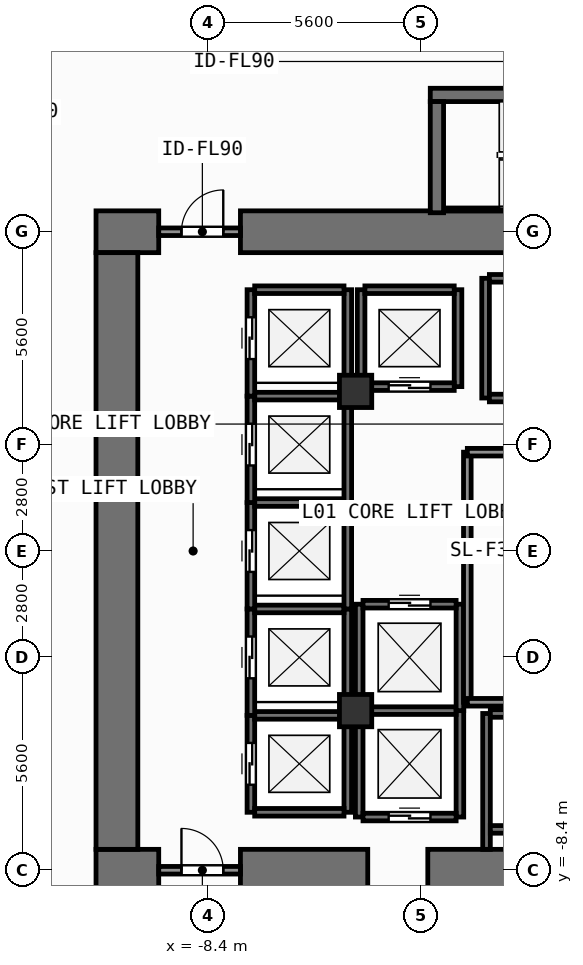
"""IFC4 building model, lengths in metres.
Left out: names, types, materials, properties, quantities, classifications, styles, units other than length and angle.
Written with IfcOpenShell. Run it as: python <this file> out.ifc"""

import sys

from ifc_helpers import new_model, si_unit, direction, frame, frame_2d, origin, origin_2d, place, context, subcontext, project, spatial, rectangle, extrude, element, fill, save


model = new_model("IFC4")
c1 = context("Model", 3, precision=1e-05, world=origin(), true_north=direction((0.0, 1.0)))
c2 = subcontext(c1, "Body", "Model", "MODEL_VIEW")
j1 = project(units=[si_unit("LENGTHUNIT", "METRE"), si_unit("PLANEANGLEUNIT", "RADIAN")], contexts=[c1])
p1 = place(None, origin())
s1 = spatial("IfcSite", under=j1, at=p1, CompositionType="ELEMENT")
p2 = place(p1, origin())
s2 = spatial("IfcBuilding", under=s1, at=p2, CompositionType="ELEMENT")
p3 = place(p2, origin())
s3 = spatial("IfcBuildingStorey", under=s2, at=p3, CompositionType="ELEMENT", Elevation=0.0)
p4 = place(p3, frame((-11.35, -8.4, 0.0), z_axis=(0.0, 0.0, 1.0), x_axis=(1.0, 0.0, 0.0)))
e1 = element("IfcWall", 1, at=p4, inside=s3, PredefinedType="SHEAR", context=c2, shape_type="SweptSolid", body=[
    extrude(rectangle(XDim=1.65, YDim=1.1, at=frame_2d((0.825, 0.0))), origin(), (0.0, 0.0, 1.0), 4.8),
])
p5 = place(p3, frame((-7.55, -8.4, 0.0), z_axis=(0.0, 0.0, 1.0), x_axis=(1.0, 0.0, 0.0)))
e2 = element("IfcWall", 2, at=p5, inside=s3, PredefinedType="SHEAR", context=c2, shape_type="SweptSolid", body=[
    extrude(rectangle(XDim=3.35, YDim=1.1, at=frame_2d((1.675, 0.0))), origin(), (0.0, 0.0, 1.0), 4.8),
])
p6 = place(p3, frame((-2.62, -8.4, 0.0), z_axis=(0.0, 0.0, 1.0), x_axis=(1.0, 0.0, 0.0)))
e3 = element("IfcWall", 3, at=p6, inside=s3, PredefinedType="SHEAR", context=c2, shape_type="SweptSolid", body=[
    extrude(rectangle(XDim=7.27, YDim=1.1, at=frame_2d((3.635, 0.0))), origin(), (0.0, 0.0, 1.0), 4.8),
])
p7 = place(p3, frame((-11.35, 8.4, 0.0), z_axis=(0.0, 0.0, 1.0), x_axis=(1.0, 0.0, 0.0)))
e4 = element("IfcWall", 4, at=p7, inside=s3, PredefinedType="SHEAR", context=c2, shape_type="SweptSolid", body=[
    extrude(rectangle(XDim=1.65, YDim=1.1, at=frame_2d((0.825, 0.0))), origin(), (0.0, 0.0, 1.0), 4.8),
])
p8 = place(p3, frame((-7.55, 8.4, 0.0), z_axis=(0.0, 0.0, 1.0), x_axis=(1.0, 0.0, 0.0)))
e5 = element("IfcWall", 5, at=p8, inside=s3, PredefinedType="SHEAR", context=c2, shape_type="SweptSolid", body=[
    extrude(rectangle(XDim=16.5, YDim=1.1, at=frame_2d((8.25, 0.0))), origin(), (0.0, 0.0, 1.0), 4.8),
])
p9 = place(p3, frame((-10.8, -7.85, 0.0), z_axis=(0.0, 0.0, 1.0), x_axis=(0.0, 1.0, 0.0)))
e6 = element("IfcWall", 6, at=p9, inside=s3, PredefinedType="SHEAR", context=c2, shape_type="SweptSolid", body=[
    extrude(rectangle(XDim=15.7, YDim=1.1, at=frame_2d((7.85, 0.0))), origin(), (0.0, 0.0, 1.0), 4.8),
])
p10 = place(p3, frame((-2.555, 12.0, 0.0), z_axis=(0.0, 0.0, 1.0), x_axis=(1.0, 0.0, 0.0)))
e7 = element("IfcWall", 7, at=p10, inside=s3, PredefinedType="SHEAR", context=c2, shape_type="SweptSolid", body=[
    extrude(rectangle(XDim=7.31, YDim=0.35, at=frame_2d((3.655, 0.0))), origin(), (0.0, 0.0, 1.0), 4.8),
])
p11 = place(p3, frame((-2.2, 8.988, 0.0), z_axis=(0.0, 0.0, 1.0), x_axis=(1.0, 0.0, 0.0)))
e8 = element("IfcWall", 8, at=p11, inside=s3, PredefinedType="SHEAR", context=c2, shape_type="SweptSolid", body=[
    extrude(rectangle(XDim=6.6, YDim=0.075, at=frame_2d((3.3, 0.0))), origin(), (0.0, 0.0, 1.0), 4.8),
])
p12 = place(p3, frame((-2.38, 8.9, 0.0), z_axis=(0.0, 0.0, 1.0), x_axis=(0.0, 1.0, 0.0)))
e9 = element("IfcWall", 9, at=p12, inside=s3, PredefinedType="SHEAR", context=c2, shape_type="SweptSolid", body=[
    extrude(rectangle(XDim=2.925, YDim=0.35, at=frame_2d((1.462, 0.0))), origin(), (0.0, 0.0, 1.0), 4.8),
])
for number, where, z_axis, x_axis in (
    (10, (-4.52, -4.2, 0.0), (0.0, 0.0, 1.0), (1.0, 0.0, 0.0)),
    (11, (-4.52, 4.2, 0.0), (0.0, 0.0, 1.0), (1.0, 0.0, 0.0)),
):
    element("IfcColumn", number, at=place(p3, frame(where, z_axis=z_axis, x_axis=x_axis)), inside=s3, PredefinedType="COLUMN", context=c2, shape_type="SweptSolid", body=[
        extrude(rectangle(XDim=0.85, YDim=0.85, at=origin_2d()), origin(), (0.0, 0.0, 1.0), 4.8),
    ])
p13 = place(p3, frame((-7.275, -6.875, 0.0), z_axis=(0.0, 0.0, 1.0), x_axis=(0.0, 1.0, 0.0)))
e12 = element("IfcWall", 12, at=p13, inside=s3, PredefinedType="SHEAR", context=c2, shape_type="SweptSolid", body=[
    extrude(rectangle(XDim=2.55, YDim=0.2, at=frame_2d((1.275, 0.0))), origin(), (0.0, 0.0, 1.0), 4.56),
])
p14 = place(p13, frame((0.725, 0.0, 0.0)))
e13 = element("IfcOpeningElement", 13, at=p14, cuts=e12, PredefinedType="OPENING", context=c2, shape_type="SweptSolid", body=[
    extrude(rectangle(XDim=1.1, YDim=2.2, at=frame_2d((0.55, 1.1))), frame((0.0, 0.11, 0.0), z_axis=(0.0, -1.0, 0.0), x_axis=(1.0, 0.0, 0.0)), (0.0, 0.0, 1.0), 0.22),
])
p15 = place(p3, frame((-4.725, -6.875, 0.0), z_axis=(0.0, 0.0, 1.0), x_axis=(0.0, 1.0, 0.0)))
e14 = element("IfcWall", 14, at=p15, inside=s3, PredefinedType="SHEAR", context=c2, shape_type="SweptSolid", body=[
    extrude(rectangle(XDim=2.55, YDim=0.2, at=frame_2d((1.275, 0.0))), origin(), (0.0, 0.0, 1.0), 4.56),
])
for number, where, z_axis, x_axis in (
    (15, (-7.175, -6.875, 0.0), (0.0, 0.0, 1.0), (1.0, 0.0, 0.0)),
    (16, (-7.175, -4.325, 0.0), (0.0, 0.0, 1.0), (1.0, 0.0, 0.0)),
):
    element("IfcWall", number, at=place(p3, frame(where, z_axis=z_axis, x_axis=x_axis)), inside=s3, PredefinedType="SHEAR", context=c2, shape_type="SweptSolid", body=[
        extrude(rectangle(XDim=2.35, YDim=0.2, at=frame_2d((1.175, 0.0))), origin(), (0.0, 0.0, 1.0), 4.56),
    ])
p16 = place(p3, frame((-7.275, -4.325, 0.0), z_axis=(0.0, 0.0, 1.0), x_axis=(0.0, 1.0, 0.0)))
e17 = element("IfcWall", 17, at=p16, inside=s3, PredefinedType="SHEAR", context=c2, shape_type="SweptSolid", body=[
    extrude(rectangle(XDim=2.8, YDim=0.2, at=frame_2d((1.4, 0.0))), origin(), (0.0, 0.0, 1.0), 4.56),
])
p17 = place(p16, frame((0.975, 0.0, 0.0)))
e18 = element("IfcOpeningElement", 18, at=p17, cuts=e17, PredefinedType="OPENING", context=c2, shape_type="SweptSolid", body=[
    extrude(rectangle(XDim=1.1, YDim=2.2, at=frame_2d((0.55, 1.1))), frame((0.0, 0.11, 0.0), z_axis=(0.0, -1.0, 0.0), x_axis=(1.0, 0.0, 0.0)), (0.0, 0.0, 1.0), 0.22),
])
p18 = place(p3, frame((-4.725, -4.325, 0.0), z_axis=(0.0, 0.0, 1.0), x_axis=(0.0, 1.0, 0.0)))
e19 = element("IfcWall", 19, at=p18, inside=s3, PredefinedType="SHEAR", context=c2, shape_type="SweptSolid", body=[
    extrude(rectangle(XDim=2.8, YDim=0.2, at=frame_2d((1.4, 0.0))), origin(), (0.0, 0.0, 1.0), 4.56),
])
p19 = place(p3, frame((-7.175, -1.525, 0.0), z_axis=(0.0, 0.0, 1.0), x_axis=(1.0, 0.0, 0.0)))
e20 = element("IfcWall", 20, at=p19, inside=s3, PredefinedType="SHEAR", context=c2, shape_type="SweptSolid", body=[
    extrude(rectangle(XDim=2.35, YDim=0.2, at=frame_2d((1.175, 0.0))), origin(), (0.0, 0.0, 1.0), 4.56),
])
p20 = place(p3, frame((-7.275, -1.525, 0.0), z_axis=(0.0, 0.0, 1.0), x_axis=(0.0, 1.0, 0.0)))
e21 = element("IfcWall", 21, at=p20, inside=s3, PredefinedType="SHEAR", context=c2, shape_type="SweptSolid", body=[
    extrude(rectangle(XDim=2.8, YDim=0.2, at=frame_2d((1.4, 0.0))), origin(), (0.0, 0.0, 1.0), 4.56),
])
p21 = place(p20, frame((0.975, 0.0, 0.0)))
e22 = element("IfcOpeningElement", 22, at=p21, cuts=e21, PredefinedType="OPENING", context=c2, shape_type="SweptSolid", body=[
    extrude(rectangle(XDim=1.1, YDim=2.2, at=frame_2d((0.55, 1.1))), frame((0.0, 0.11, 0.0), z_axis=(0.0, -1.0, 0.0), x_axis=(1.0, 0.0, 0.0)), (0.0, 0.0, 1.0), 0.22),
])
p22 = place(p3, frame((-4.725, -1.525, 0.0), z_axis=(0.0, 0.0, 1.0), x_axis=(0.0, 1.0, 0.0)))
e23 = element("IfcWall", 23, at=p22, inside=s3, PredefinedType="SHEAR", context=c2, shape_type="SweptSolid", body=[
    extrude(rectangle(XDim=2.8, YDim=0.2, at=frame_2d((1.4, 0.0))), origin(), (0.0, 0.0, 1.0), 4.56),
])
p23 = place(p3, frame((-7.175, 1.275, 0.0), z_axis=(0.0, 0.0, 1.0), x_axis=(1.0, 0.0, 0.0)))
e24 = element("IfcWall", 24, at=p23, inside=s3, PredefinedType="SHEAR", context=c2, shape_type="SweptSolid", body=[
    extrude(rectangle(XDim=2.35, YDim=0.2, at=frame_2d((1.175, 0.0))), origin(), (0.0, 0.0, 1.0), 4.56),
])
p24 = place(p3, frame((-7.275, 1.275, 0.0), z_axis=(0.0, 0.0, 1.0), x_axis=(0.0, 1.0, 0.0)))
e25 = element("IfcWall", 25, at=p24, inside=s3, PredefinedType="SHEAR", context=c2, shape_type="SweptSolid", body=[
    extrude(rectangle(XDim=2.8, YDim=0.2, at=frame_2d((1.4, 0.0))), origin(), (0.0, 0.0, 1.0), 4.56),
])
p25 = place(p24, frame((0.975, 0.0, 0.0)))
e26 = element("IfcOpeningElement", 26, at=p25, cuts=e25, PredefinedType="OPENING", context=c2, shape_type="SweptSolid", body=[
    extrude(rectangle(XDim=1.1, YDim=2.2, at=frame_2d((0.55, 1.1))), frame((0.0, 0.11, 0.0), z_axis=(0.0, -1.0, 0.0), x_axis=(1.0, 0.0, 0.0)), (0.0, 0.0, 1.0), 0.22),
])
p26 = place(p3, frame((-4.725, 1.275, 0.0), z_axis=(0.0, 0.0, 1.0), x_axis=(0.0, 1.0, 0.0)))
e27 = element("IfcWall", 27, at=p26, inside=s3, PredefinedType="SHEAR", context=c2, shape_type="SweptSolid", body=[
    extrude(rectangle(XDim=2.8, YDim=0.2, at=frame_2d((1.4, 0.0))), origin(), (0.0, 0.0, 1.0), 4.56),
])
p27 = place(p3, frame((-7.175, 4.075, 0.0), z_axis=(0.0, 0.0, 1.0), x_axis=(1.0, 0.0, 0.0)))
e28 = element("IfcWall", 28, at=p27, inside=s3, PredefinedType="SHEAR", context=c2, shape_type="SweptSolid", body=[
    extrude(rectangle(XDim=2.35, YDim=0.2, at=frame_2d((1.175, 0.0))), origin(), (0.0, 0.0, 1.0), 4.56),
])
p28 = place(p3, frame((-7.275, 4.075, 0.0), z_axis=(0.0, 0.0, 1.0), x_axis=(0.0, 1.0, 0.0)))
e29 = element("IfcWall", 29, at=p28, inside=s3, PredefinedType="SHEAR", context=c2, shape_type="SweptSolid", body=[
    extrude(rectangle(XDim=2.8, YDim=0.2, at=frame_2d((1.4, 0.0))), origin(), (0.0, 0.0, 1.0), 4.56),
])
p29 = place(p28, frame((0.975, 0.0, 0.0)))
e30 = element("IfcOpeningElement", 30, at=p29, cuts=e29, PredefinedType="OPENING", context=c2, shape_type="SweptSolid", body=[
    extrude(rectangle(XDim=1.1, YDim=2.2, at=frame_2d((0.55, 1.1))), frame((0.0, 0.11, 0.0), z_axis=(0.0, -1.0, 0.0), x_axis=(1.0, 0.0, 0.0)), (0.0, 0.0, 1.0), 0.22),
])
p30 = place(p3, frame((-4.725, 4.075, 0.0), z_axis=(0.0, 0.0, 1.0), x_axis=(0.0, 1.0, 0.0)))
e31 = element("IfcWall", 31, at=p30, inside=s3, PredefinedType="SHEAR", context=c2, shape_type="SweptSolid", body=[
    extrude(rectangle(XDim=2.8, YDim=0.2, at=frame_2d((1.4, 0.0))), origin(), (0.0, 0.0, 1.0), 4.56),
])
p31 = place(p3, frame((-7.175, 6.875, 0.0), z_axis=(0.0, 0.0, 1.0), x_axis=(1.0, 0.0, 0.0)))
e32 = element("IfcWall", 32, at=p31, inside=s3, PredefinedType="SHEAR", context=c2, shape_type="SweptSolid", body=[
    extrude(rectangle(XDim=2.35, YDim=0.2, at=frame_2d((1.175, 0.0))), origin(), (0.0, 0.0, 1.0), 4.56),
])
for number, where, z_axis, x_axis in (
    (33, (-4.375, 4.325, 0.0), (0.0, 0.0, 1.0), (0.0, 1.0, 0.0)),
    (34, (-1.825, 4.325, 0.0), (0.0, 0.0, 1.0), (0.0, 1.0, 0.0)),
):
    element("IfcWall", number, at=place(p3, frame(where, z_axis=z_axis, x_axis=x_axis)), inside=s3, PredefinedType="SHEAR", context=c2, shape_type="SweptSolid", body=[
        extrude(rectangle(XDim=2.55, YDim=0.2, at=frame_2d((1.275, 0.0))), origin(), (0.0, 0.0, 1.0), 4.56),
    ])
p32 = place(p3, frame((-4.275, 4.325, 0.0), z_axis=(0.0, 0.0, 1.0), x_axis=(1.0, 0.0, 0.0)))
e35 = element("IfcWall", 35, at=p32, inside=s3, PredefinedType="SHEAR", context=c2, shape_type="SweptSolid", body=[
    extrude(rectangle(XDim=2.35, YDim=0.2, at=frame_2d((1.175, 0.0))), origin(), (0.0, 0.0, 1.0), 4.56),
])
p33 = place(p32, frame((0.625, 0.0, 0.0)))
e36 = element("IfcOpeningElement", 36, at=p33, cuts=e35, PredefinedType="OPENING", context=c2, shape_type="SweptSolid", body=[
    extrude(rectangle(XDim=1.1, YDim=2.2, at=frame_2d((0.55, 1.1))), frame((0.0, 0.11, 0.0), z_axis=(0.0, -1.0, 0.0), x_axis=(1.0, 0.0, 0.0)), (0.0, 0.0, 1.0), 0.22),
])
p34 = place(p3, frame((-4.275, 6.875, 0.0), z_axis=(0.0, 0.0, 1.0), x_axis=(1.0, 0.0, 0.0)))
e37 = element("IfcWall", 37, at=p34, inside=s3, PredefinedType="SHEAR", context=c2, shape_type="SweptSolid", body=[
    extrude(rectangle(XDim=2.35, YDim=0.2, at=frame_2d((1.175, 0.0))), origin(), (0.0, 0.0, 1.0), 4.56),
])
for number, where, z_axis, x_axis in (
    (38, (-4.425, -7.0, 0.0), (0.0, 0.0, 1.0), (0.0, 1.0, 0.0)),
    (39, (-1.775, -7.0, 0.0), (0.0, 0.0, 1.0), (0.0, 1.0, 0.0)),
):
    element("IfcWall", number, at=place(p3, frame(where, z_axis=z_axis, x_axis=x_axis)), inside=s3, PredefinedType="SHEAR", context=c2, shape_type="SweptSolid", body=[
        extrude(rectangle(XDim=2.8, YDim=0.2, at=frame_2d((1.4, 0.0))), origin(), (0.0, 0.0, 1.0), 4.56),
    ])
p35 = place(p3, frame((-4.325, -7.0, 0.0), z_axis=(0.0, 0.0, 1.0), x_axis=(1.0, 0.0, 0.0)))
e40 = element("IfcWall", 40, at=p35, inside=s3, PredefinedType="SHEAR", context=c2, shape_type="SweptSolid", body=[
    extrude(rectangle(XDim=2.45, YDim=0.2, at=frame_2d((1.225, 0.0))), origin(), (0.0, 0.0, 1.0), 4.56),
])
p36 = place(p35, frame((0.675, 0.0, 0.0)))
e41 = element("IfcOpeningElement", 41, at=p36, cuts=e40, PredefinedType="OPENING", context=c2, shape_type="SweptSolid", body=[
    extrude(rectangle(XDim=1.1, YDim=2.2, at=frame_2d((0.55, 1.1))), frame((0.0, 0.11, 0.0), z_axis=(0.0, -1.0, 0.0), x_axis=(1.0, 0.0, 0.0)), (0.0, 0.0, 1.0), 0.22),
])
p37 = place(p3, frame((-4.325, -4.2, 0.0), z_axis=(0.0, 0.0, 1.0), x_axis=(1.0, 0.0, 0.0)))
e42 = element("IfcWall", 42, at=p37, inside=s3, PredefinedType="SHEAR", context=c2, shape_type="SweptSolid", body=[
    extrude(rectangle(XDim=2.45, YDim=0.2, at=frame_2d((1.225, 0.0))), origin(), (0.0, 0.0, 1.0), 4.56),
])
for number, where, z_axis, x_axis in (
    (43, (-4.425, -4.2, 0.0), (0.0, 0.0, 1.0), (0.0, 1.0, 0.0)),
    (44, (-1.775, -4.2, 0.0), (0.0, 0.0, 1.0), (0.0, 1.0, 0.0)),
):
    element("IfcWall", number, at=place(p3, frame(where, z_axis=z_axis, x_axis=x_axis)), inside=s3, PredefinedType="SHEAR", context=c2, shape_type="SweptSolid", body=[
        extrude(rectangle(XDim=2.8, YDim=0.2, at=frame_2d((1.4, 0.0))), origin(), (0.0, 0.0, 1.0), 4.56),
    ])
p38 = place(p3, frame((-4.325, -1.4, 0.0), z_axis=(0.0, 0.0, 1.0), x_axis=(1.0, 0.0, 0.0)))
e45 = element("IfcWall", 45, at=p38, inside=s3, PredefinedType="SHEAR", context=c2, shape_type="SweptSolid", body=[
    extrude(rectangle(XDim=2.45, YDim=0.2, at=frame_2d((1.225, 0.0))), origin(), (0.0, 0.0, 1.0), 4.56),
])
p39 = place(p38, frame((0.675, 0.0, 0.0)))
e46 = element("IfcOpeningElement", 46, at=p39, cuts=e45, PredefinedType="OPENING", context=c2, shape_type="SweptSolid", body=[
    extrude(rectangle(XDim=1.1, YDim=2.2, at=frame_2d((0.55, 1.1))), frame((0.0, 0.11, 0.0), z_axis=(0.0, -1.0, 0.0), x_axis=(1.0, 0.0, 0.0)), (0.0, 0.0, 1.0), 0.22),
])
p40 = place(p3, frame((-1.1, 4.025, 0.0), z_axis=(0.0, 0.0, 1.0), x_axis=(0.0, 1.0, 0.0)))
e47 = element("IfcWall", 47, at=p40, inside=s3, PredefinedType="SHEAR", context=c2, shape_type="SweptSolid", body=[
    extrude(rectangle(XDim=3.15, YDim=0.2, at=frame_2d((1.575, 0.0))), origin(), (0.0, 0.0, 1.0), 4.56),
])
for number, where, z_axis, x_axis in (
    (48, (-1.0, 4.025, 0.0), (0.0, 0.0, 1.0), (1.0, 0.0, 0.0)),
    (49, (-1.0, 7.175, 0.0), (0.0, 0.0, 1.0), (1.0, 0.0, 0.0)),
):
    element("IfcWall", number, at=place(p3, frame(where, z_axis=z_axis, x_axis=x_axis)), inside=s3, PredefinedType="SHEAR", context=c2, shape_type="SweptSolid", body=[
        extrude(rectangle(XDim=2.4, YDim=0.2, at=frame_2d((1.2, 0.0))), origin(), (0.0, 0.0, 1.0), 4.56),
    ])
p41 = place(p3, frame((-1.075, -7.85, 0.0), z_axis=(0.0, 0.0, 1.0), x_axis=(0.0, 1.0, 0.0)))
e50 = element("IfcWall", 50, at=p41, inside=s3, PredefinedType="SHEAR", context=c2, shape_type="SweptSolid", body=[
    extrude(rectangle(XDim=3.575, YDim=0.2, at=frame_2d((1.788, 0.0))), origin(), (0.0, 0.0, 1.0), 4.56),
])
for number, where, z_axis, x_axis in (
    (51, (-0.975, -7.325, 0.0), (0.0, 0.0, 1.0), (1.0, 0.0, 0.0)),
    (52, (-0.975, -4.275, 0.0), (0.0, 0.0, 1.0), (1.0, 0.0, 0.0)),
):
    element("IfcWall", number, at=place(p3, frame(where, z_axis=z_axis, x_axis=x_axis)), inside=s3, PredefinedType="SHEAR", context=c2, shape_type="SweptSolid", body=[
        extrude(rectangle(XDim=2.35, YDim=0.2, at=frame_2d((1.175, 0.0))), origin(), (0.0, 0.0, 1.0), 4.56),
    ])
p42 = place(p3, frame((-9.7, -8.4, 0.0), z_axis=(0.0, 0.0, 1.0), x_axis=(1.0, 0.0, 0.0)))
e53 = element("IfcWall", 53, at=p42, inside=s3, PredefinedType="SOLIDWALL", context=c2, shape_type="SweptSolid", body=[
    extrude(rectangle(XDim=2.15, YDim=0.2, at=frame_2d((1.075, 0.0))), origin(), (0.0, 0.0, 1.0), 3.6),
])
p43 = place(p42, frame((0.598, 0.0, 0.0)))
e54 = element("IfcOpeningElement", 54, at=p43, cuts=e53, PredefinedType="OPENING", context=c2, shape_type="SweptSolid", body=[
    extrude(rectangle(XDim=1.1, YDim=2.15, at=frame_2d((0.55, 1.075))), frame((0.0, 0.11, 0.0), z_axis=(0.0, -1.0, 0.0), x_axis=(1.0, 0.0, 0.0)), (0.0, 0.0, 1.0), 0.22),
])
p44 = place(p3, frame((-9.7, 8.4, 0.0), z_axis=(0.0, 0.0, 1.0), x_axis=(1.0, 0.0, 0.0)))
e55 = element("IfcWall", 55, at=p44, inside=s3, PredefinedType="SOLIDWALL", context=c2, shape_type="SweptSolid", body=[
    extrude(rectangle(XDim=2.15, YDim=0.2, at=frame_2d((1.075, 0.0))), origin(), (0.0, 0.0, 1.0), 3.6),
])
p45 = place(p44, frame((0.598, 0.0, 0.0)))
e56 = element("IfcOpeningElement", 56, at=p45, cuts=e55, PredefinedType="OPENING", context=c2, shape_type="SweptSolid", body=[
    extrude(rectangle(XDim=1.1, YDim=2.15, at=frame_2d((0.55, 1.075))), frame((0.0, 0.11, 0.0), z_axis=(0.0, -1.0, 0.0), x_axis=(1.0, 0.0, 0.0)), (0.0, 0.0, 1.0), 0.22),
])
p46 = place(p3, frame((-1.58, -3.98, 0.0), z_axis=(0.0, 0.0, 1.0), x_axis=(0.0, 1.0, 0.0)))
e57 = element("IfcWall", 57, at=p46, inside=s3, PredefinedType="SOLIDWALL", context=c2, shape_type="SweptSolid", body=[
    extrude(rectangle(XDim=6.58, YDim=0.2, at=frame_2d((3.29, 0.0))), origin(), (0.0, 0.0, 1.0), 4.56),
])
for number, where, z_axis, x_axis in (
    (58, (-1.58, -3.98, 0.0), (0.0, 0.0, 1.0), (1.0, 0.0, 0.0)),
    (59, (-1.58, 2.6, 0.0), (0.0, 0.0, 1.0), (1.0, 0.0, 0.0)),
):
    element("IfcWall", number, at=place(p3, frame(where, z_axis=z_axis, x_axis=x_axis)), inside=s3, PredefinedType="SOLIDWALL", context=c2, shape_type="SweptSolid", body=[
        extrude(rectangle(XDim=3.19, YDim=0.2, at=frame_2d((1.595, 0.0))), origin(), (0.0, 0.0, 1.0), 4.56),
    ])
p47 = place(p14, origin())
e60 = element("IfcDoor", 60, at=p47, inside=s3, OperationType="SLIDING_TO_LEFT", PredefinedType="DOOR", context=c2, shape_type="SweptSolid", body=[
    extrude(rectangle(XDim=1.1, YDim=2.2, at=frame_2d((0.55, 1.1))), frame((0.0, 0.025, 0.0), z_axis=(0.0, -1.0, 0.0), x_axis=(1.0, 0.0, 0.0)), (0.0, 0.0, 1.0), 0.05),
])
fill(e13, e60)
p48 = place(p17, origin())
e61 = element("IfcDoor", 61, at=p48, inside=s3, OperationType="SLIDING_TO_LEFT", PredefinedType="DOOR", context=c2, shape_type="SweptSolid", body=[
    extrude(rectangle(XDim=1.1, YDim=2.2, at=frame_2d((0.55, 1.1))), frame((0.0, 0.025, 0.0), z_axis=(0.0, -1.0, 0.0), x_axis=(1.0, 0.0, 0.0)), (0.0, 0.0, 1.0), 0.05),
])
fill(e18, e61)
p49 = place(p21, origin())
e62 = element("IfcDoor", 62, at=p49, inside=s3, OperationType="SLIDING_TO_LEFT", PredefinedType="DOOR", context=c2, shape_type="SweptSolid", body=[
    extrude(rectangle(XDim=1.1, YDim=2.2, at=frame_2d((0.55, 1.1))), frame((0.0, 0.025, 0.0), z_axis=(0.0, -1.0, 0.0), x_axis=(1.0, 0.0, 0.0)), (0.0, 0.0, 1.0), 0.05),
])
fill(e22, e62)
p50 = place(p25, origin())
e63 = element("IfcDoor", 63, at=p50, inside=s3, OperationType="SLIDING_TO_LEFT", PredefinedType="DOOR", context=c2, shape_type="SweptSolid", body=[
    extrude(rectangle(XDim=1.1, YDim=2.2, at=frame_2d((0.55, 1.1))), frame((0.0, 0.025, 0.0), z_axis=(0.0, -1.0, 0.0), x_axis=(1.0, 0.0, 0.0)), (0.0, 0.0, 1.0), 0.05),
])
fill(e26, e63)
p51 = place(p29, origin())
e64 = element("IfcDoor", 64, at=p51, inside=s3, OperationType="SLIDING_TO_LEFT", PredefinedType="DOOR", context=c2, shape_type="SweptSolid", body=[
    extrude(rectangle(XDim=1.1, YDim=2.2, at=frame_2d((0.55, 1.1))), frame((0.0, 0.025, 0.0), z_axis=(0.0, -1.0, 0.0), x_axis=(1.0, 0.0, 0.0)), (0.0, 0.0, 1.0), 0.05),
])
fill(e30, e64)
p52 = place(p33, origin())
e65 = element("IfcDoor", 65, at=p52, inside=s3, OperationType="SLIDING_TO_LEFT", PredefinedType="DOOR", context=c2, shape_type="SweptSolid", body=[
    extrude(rectangle(XDim=1.1, YDim=2.2, at=frame_2d((0.55, 1.1))), frame((0.0, 0.025, 0.0), z_axis=(0.0, -1.0, 0.0), x_axis=(1.0, 0.0, 0.0)), (0.0, 0.0, 1.0), 0.05),
])
fill(e36, e65)
p53 = place(p36, origin())
e66 = element("IfcDoor", 66, at=p53, inside=s3, OperationType="SLIDING_TO_LEFT", PredefinedType="DOOR", context=c2, shape_type="SweptSolid", body=[
    extrude(rectangle(XDim=1.1, YDim=2.2, at=frame_2d((0.55, 1.1))), frame((0.0, 0.025, 0.0), z_axis=(0.0, -1.0, 0.0), x_axis=(1.0, 0.0, 0.0)), (0.0, 0.0, 1.0), 0.05),
])
fill(e41, e66)
p54 = place(p39, origin())
e67 = element("IfcDoor", 67, at=p54, inside=s3, OperationType="SLIDING_TO_LEFT", PredefinedType="DOOR", context=c2, shape_type="SweptSolid", body=[
    extrude(rectangle(XDim=1.1, YDim=2.2, at=frame_2d((0.55, 1.1))), frame((0.0, 0.025, 0.0), z_axis=(0.0, -1.0, 0.0), x_axis=(1.0, 0.0, 0.0)), (0.0, 0.0, 1.0), 0.05),
])
fill(e46, e67)
p55 = place(p43, origin())
e68 = element("IfcDoor", 68, at=p55, inside=s3, OperationType="SINGLE_SWING_LEFT", PredefinedType="DOOR", context=c2, shape_type="SweptSolid", body=[
    extrude(rectangle(XDim=1.1, YDim=2.15, at=frame_2d((0.55, 1.075))), frame((0.0, 0.025, 0.0), z_axis=(0.0, -1.0, 0.0), x_axis=(1.0, 0.0, 0.0)), (0.0, 0.0, 1.0), 0.05),
])
fill(e54, e68)
p56 = place(p45, origin())
e69 = element("IfcDoor", 69, at=p56, inside=s3, OperationType="SINGLE_SWING_RIGHT", PredefinedType="DOOR", context=c2, shape_type="SweptSolid", body=[
    extrude(rectangle(XDim=1.1, YDim=2.15, at=frame_2d((0.55, 1.075))), frame((0.0, 0.025, 0.0), z_axis=(0.0, -1.0, 0.0), x_axis=(1.0, 0.0, 0.0)), (0.0, 0.0, 1.0), 0.05),
])
fill(e56, e69)
save(model, sys.argv[1])
